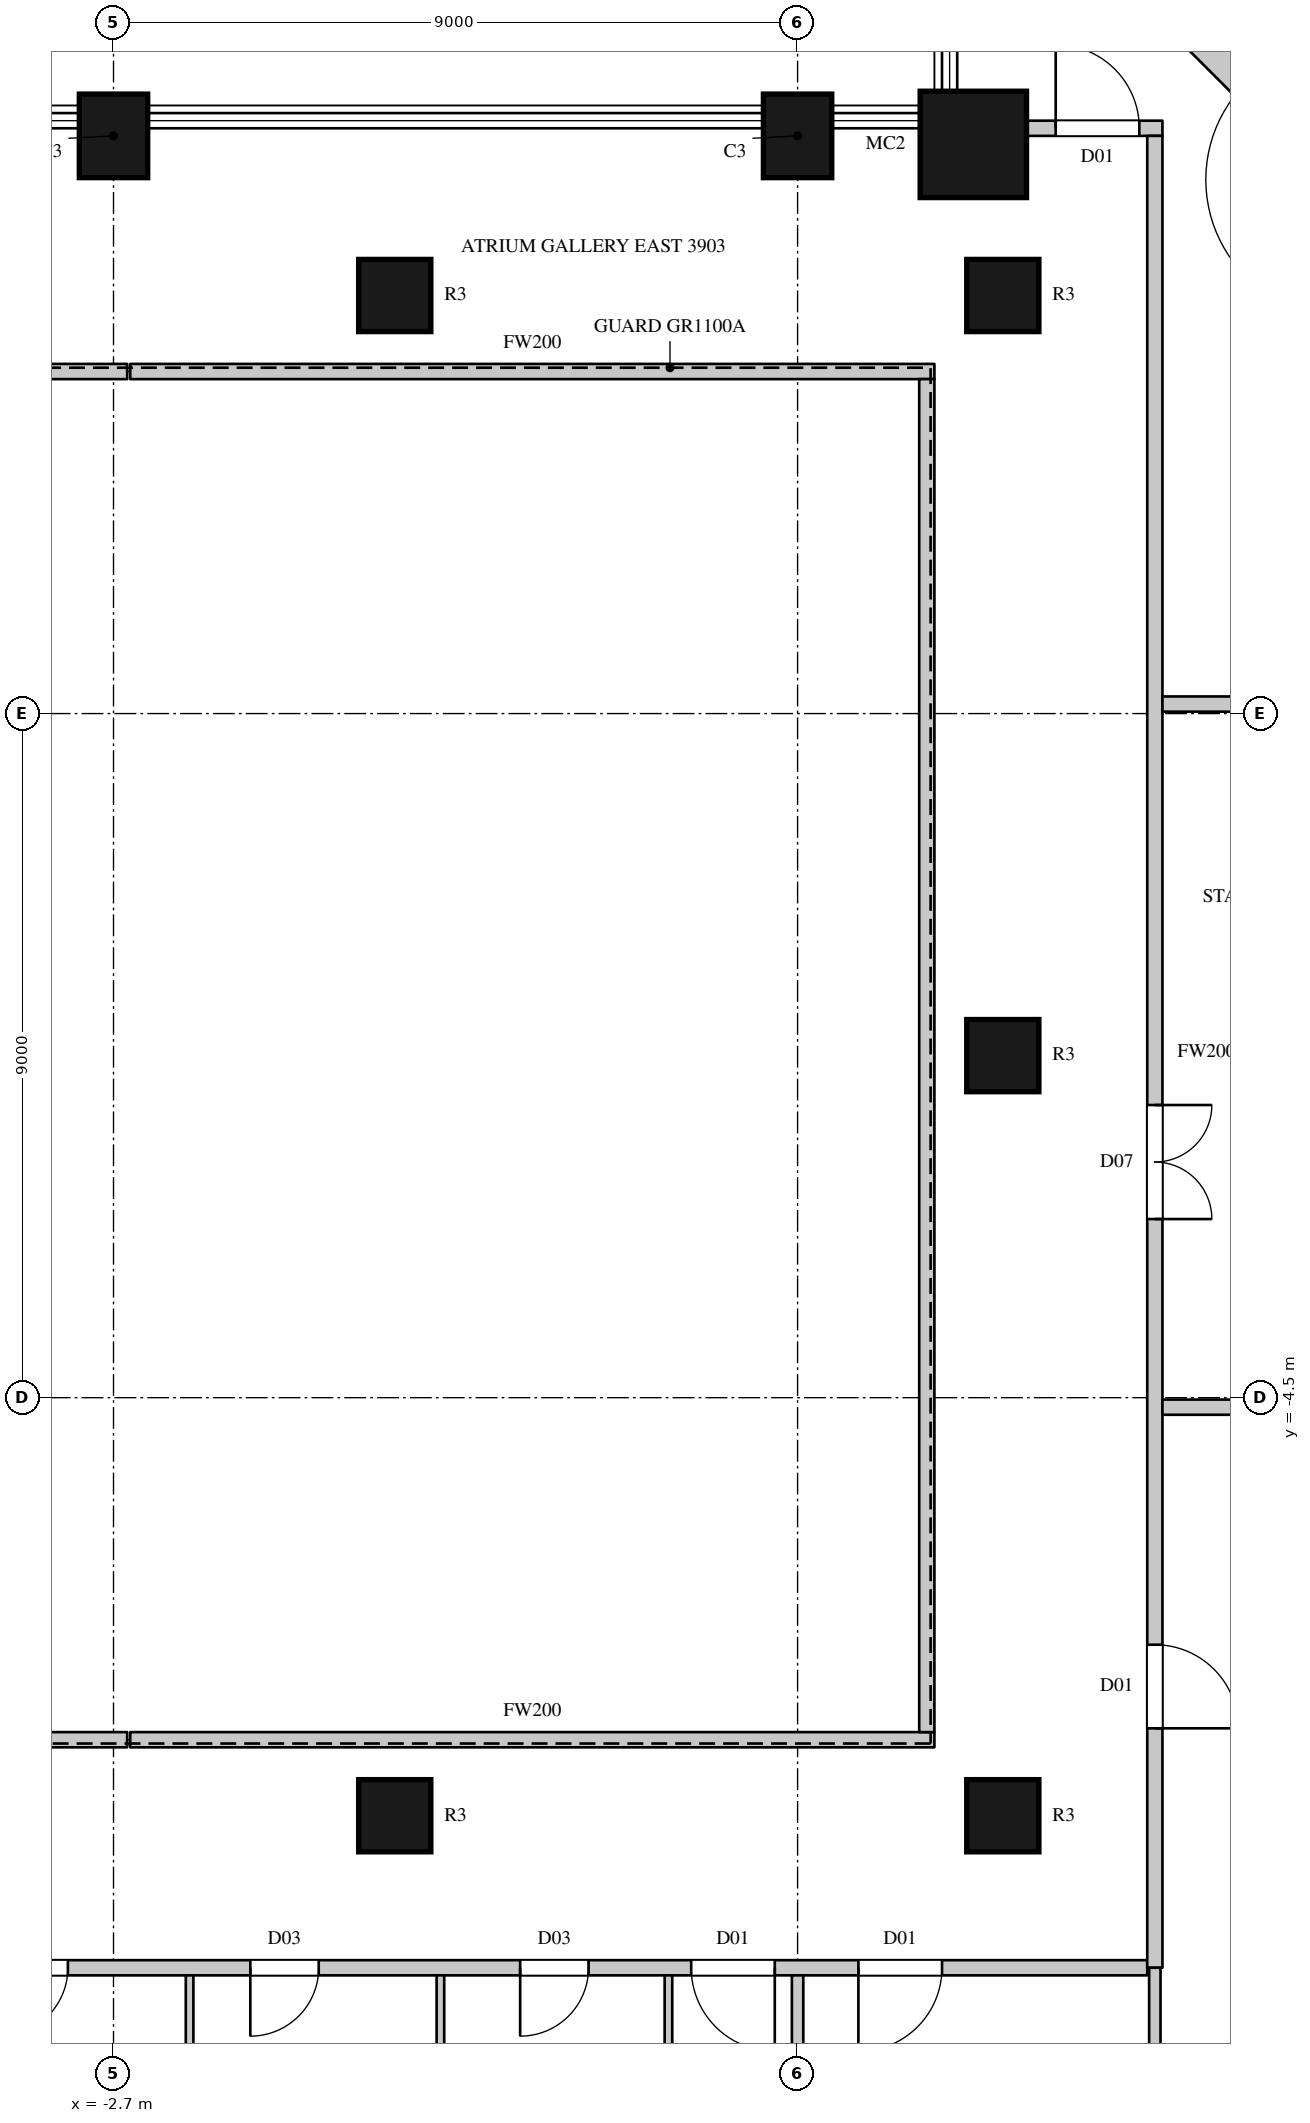
"""IFC4 building model, lengths in metres.
Left out: names, types, materials, properties, quantities, classifications, styles, units other than length and angle.
Written with IfcOpenShell. Run it as: python <this file> out.ifc"""

import sys

from ifc_helpers import new_model, si_unit, direction, frame, frame_2d, origin, origin_2d, place, context, subcontext, project, spatial, rectangle, circle, extrude, element, fill, save


model = new_model("IFC4")
c1 = context("Model", 3, precision=1e-05, world=origin(), true_north=direction((0.0, 1.0)))
c2 = subcontext(c1, "Body", "Model", "MODEL_VIEW")
j1 = project(units=[si_unit("LENGTHUNIT", "METRE"), si_unit("PLANEANGLEUNIT", "RADIAN")], contexts=[c1])
p1 = place(None, origin())
s1 = spatial("IfcSite", under=j1, at=p1, CompositionType="ELEMENT")
p2 = place(p1, origin())
s2 = spatial("IfcBuilding", under=s1, at=p2, CompositionType="ELEMENT")
p3 = place(p2, frame((0.0, 0.0, 181.0)))
s3 = spatial("IfcBuildingStorey", under=s2, at=p3, CompositionType="ELEMENT", Elevation=181.0)
p4 = place(p3, frame((8.612, 11.988, 0.0), z_axis=(0.0, 0.0, 1.0), x_axis=(1.0, 0.0, 0.0)))
e1 = element("IfcColumn", 1, at=p4, inside=s3, PredefinedType="COLUMN", context=c2, shape_type="SweptSolid", body=[
    extrude(circle(Radius=0.7, at=origin_2d()), origin(), (0.0, 0.0, 1.0), 4.1),
])
for number, where, z_axis, x_axis in (
    (2, (6.3, 12.1, 0.0), (0.0, 0.0, 1.0), (-1.0, 0.0, 0.0)),
    (3, (-2.7, 12.1, 0.0), (0.0, 0.0, 1.0), (-1.0, 0.0, 0.0)),
):
    element("IfcColumn", number, at=place(p3, frame(where, z_axis=z_axis, x_axis=x_axis)), inside=s3, PredefinedType="COLUMN", context=c2, shape_type="SweptSolid", body=[
        extrude(rectangle(XDim=0.9, YDim=1.1, at=origin_2d()), origin(), (0.0, 0.0, 1.0), 4.1),
    ])
for number, where, z_axis, x_axis in (
    (4, (1.0, -10.0, 0.0), (0.0, 0.0, 1.0), (1.0, 0.0, 0.0)),
    (5, (1.0, 10.0, 0.0), (0.0, 0.0, 1.0), (1.0, 0.0, 0.0)),
    (6, (9.0, -10.0, 0.0), (0.0, 0.0, 1.0), (1.0, 0.0, 0.0)),
    (7, (9.0, 0.0, 0.0), (0.0, 0.0, 1.0), (1.0, 0.0, 0.0)),
    (8, (9.0, 10.0, 0.0), (0.0, 0.0, 1.0), (1.0, 0.0, 0.0)),
):
    element("IfcColumn", number, at=place(p3, frame(where, z_axis=z_axis, x_axis=x_axis)), inside=s3, PredefinedType="COLUMN", context=c2, shape_type="SweptSolid", body=[
        extrude(circle(Radius=0.475, at=origin_2d()), origin(), (0.0, 0.0, 1.0), 4.1),
    ])
p5 = place(p3, frame((13.941, 11.053, 0.0), z_axis=(0.0, 0.0, 1.0), x_axis=(-0.707106781187, 0.707106781187, 0.0)))
e9 = element("IfcWall", 9, at=p5, inside=s3, PredefinedType="SOLIDWALL", context=c2, shape_type="SweptSolid", body=[
    extrude(rectangle(XDim=6.505, YDim=0.45, at=frame_2d((3.252, 0.0))), origin(), (0.0, 0.0, 1.0), 3.8),
])
p6 = place(p5, frame((0.665, 0.0, 0.0)))
e10 = element("IfcOpeningElement", 10, at=p6, cuts=e9, PredefinedType="OPENING", context=c2, shape_type="SweptSolid", body=[
    extrude(rectangle(XDim=1.8, YDim=2.4, at=frame_2d((0.9, 1.2))), frame((0.0, 0.235, 0.0), z_axis=(0.0, -1.0, 0.0), x_axis=(1.0, 0.0, 0.0)), (0.0, 0.0, 1.0), 0.47),
])
p7 = place(p3, frame((-10.9, -12.0, 0.0), z_axis=(0.0, 0.0, 1.0), x_axis=(1.0, 0.0, 0.0)))
e11 = element("IfcWall", 11, at=p7, inside=s3, PredefinedType="PARTITIONING", context=c2, shape_type="SweptSolid", body=[
    extrude(rectangle(XDim=21.8, YDim=0.2, at=frame_2d((10.9, 0.0))), origin(), (0.0, 0.0, 1.0), 3.8),
])
p8 = place(p7, frame((0.95, 0.0, 0.0)))
e12 = element("IfcOpeningElement", 12, at=p8, cuts=e11, PredefinedType="OPENING", context=c2, shape_type="SweptSolid", body=[
    extrude(rectangle(XDim=0.9, YDim=2.2, at=frame_2d((0.45, 1.1))), frame((0.0, 0.11, 0.0), z_axis=(0.0, -1.0, 0.0), x_axis=(1.0, 0.0, 0.0)), (0.0, 0.0, 1.0), 0.22),
])
p9 = place(p7, frame((3.95, 0.0, 0.0)))
e13 = element("IfcOpeningElement", 13, at=p9, cuts=e11, PredefinedType="OPENING", context=c2, shape_type="SweptSolid", body=[
    extrude(rectangle(XDim=0.9, YDim=2.2, at=frame_2d((0.45, 1.1))), frame((0.0, 0.11, 0.0), z_axis=(0.0, -1.0, 0.0), x_axis=(1.0, 0.0, 0.0)), (0.0, 0.0, 1.0), 0.22),
])
p10 = place(p7, frame((6.7, 0.0, 0.0)))
e14 = element("IfcOpeningElement", 14, at=p10, cuts=e11, PredefinedType="OPENING", context=c2, shape_type="SweptSolid", body=[
    extrude(rectangle(XDim=0.9, YDim=2.2, at=frame_2d((0.45, 1.1))), frame((0.0, 0.11, 0.0), z_axis=(0.0, -1.0, 0.0), x_axis=(1.0, 0.0, 0.0)), (0.0, 0.0, 1.0), 0.22),
])
p11 = place(p7, frame((10.0, 0.0, 0.0)))
e15 = element("IfcOpeningElement", 15, at=p11, cuts=e11, PredefinedType="OPENING", context=c2, shape_type="SweptSolid", body=[
    extrude(rectangle(XDim=0.9, YDim=2.2, at=frame_2d((0.45, 1.1))), frame((0.0, 0.11, 0.0), z_axis=(0.0, -1.0, 0.0), x_axis=(1.0, 0.0, 0.0)), (0.0, 0.0, 1.0), 0.22),
])
p12 = place(p7, frame((13.55, 0.0, 0.0)))
e16 = element("IfcOpeningElement", 16, at=p12, cuts=e11, PredefinedType="OPENING", context=c2, shape_type="SweptSolid", body=[
    extrude(rectangle(XDim=0.9, YDim=2.2, at=frame_2d((0.45, 1.1))), frame((0.0, 0.11, 0.0), z_axis=(0.0, -1.0, 0.0), x_axis=(1.0, 0.0, 0.0)), (0.0, 0.0, 1.0), 0.22),
])
p13 = place(p7, frame((15.8, 0.0, 0.0)))
e17 = element("IfcOpeningElement", 17, at=p13, cuts=e11, PredefinedType="OPENING", context=c2, shape_type="SweptSolid", body=[
    extrude(rectangle(XDim=1.1, YDim=2.4, at=frame_2d((0.55, 1.2))), frame((0.0, 0.11, 0.0), z_axis=(0.0, -1.0, 0.0), x_axis=(1.0, 0.0, 0.0)), (0.0, 0.0, 1.0), 0.22),
])
p14 = place(p7, frame((18.0, 0.0, 0.0)))
e18 = element("IfcOpeningElement", 18, at=p14, cuts=e11, PredefinedType="OPENING", context=c2, shape_type="SweptSolid", body=[
    extrude(rectangle(XDim=1.1, YDim=2.4, at=frame_2d((0.55, 1.2))), frame((0.0, 0.11, 0.0), z_axis=(0.0, -1.0, 0.0), x_axis=(1.0, 0.0, 0.0)), (0.0, 0.0, 1.0), 0.22),
])
for number, where, z_axis, x_axis in (
    (19, (-6.1, -9.0, 0.0), (0.0, 0.0, 1.0), (1.0, 0.0, 0.0)),
    (20, (-6.1, 9.0, 0.0), (0.0, 0.0, 1.0), (1.0, 0.0, 0.0)),
):
    element("IfcWall", number, at=place(p3, frame(where, z_axis=z_axis, x_axis=x_axis)), inside=s3, PredefinedType="PARTITIONING", context=c2, shape_type="SweptSolid", body=[
        extrude(rectangle(XDim=3.58, YDim=0.2, at=frame_2d((1.79, 0.0))), origin(), (0.0, 0.0, 1.0), 3.8),
    ])
for number, where, z_axis, x_axis in (
    (21, (-2.48, -9.0, 0.0), (0.0, 0.0, 1.0), (1.0, 0.0, 0.0)),
    (22, (-2.48, 9.0, 0.0), (0.0, 0.0, 1.0), (1.0, 0.0, 0.0)),
):
    element("IfcWall", number, at=place(p3, frame(where, z_axis=z_axis, x_axis=x_axis)), inside=s3, PredefinedType="PARTITIONING", context=c2, shape_type="SweptSolid", body=[
        extrude(rectangle(XDim=10.58, YDim=0.2, at=frame_2d((5.29, 0.0))), origin(), (0.0, 0.0, 1.0), 3.8),
    ])
p15 = place(p3, frame((8.0, -8.9, 0.0), z_axis=(0.0, 0.0, 1.0), x_axis=(0.0, 1.0, 0.0)))
e23 = element("IfcWall", 23, at=p15, inside=s3, PredefinedType="PARTITIONING", context=c2, shape_type="SweptSolid", body=[
    extrude(rectangle(XDim=17.8, YDim=0.2, at=frame_2d((8.9, 0.0))), origin(), (0.0, 0.0, 1.0), 3.8),
])
p16 = place(p3, frame((9.296, 12.2, 0.0), z_axis=(0.0, 0.0, 1.0), x_axis=(1.0, 0.0, 0.0)))
e24 = element("IfcWall", 24, at=p16, inside=s3, PredefinedType="PARTITIONING", context=c2, shape_type="SweptSolid", body=[
    extrude(rectangle(XDim=1.804, YDim=0.2, at=frame_2d((0.902, 0.0))), origin(), (0.0, 0.0, 1.0), 3.8),
])
p17 = place(p16, frame((0.4, 0.0, 0.0)))
e25 = element("IfcOpeningElement", 25, at=p17, cuts=e24, PredefinedType="OPENING", context=c2, shape_type="SweptSolid", body=[
    extrude(rectangle(XDim=1.1, YDim=2.4, at=frame_2d((0.55, 1.2))), frame((0.0, 0.11, 0.0), z_axis=(0.0, -1.0, 0.0), x_axis=(1.0, 0.0, 0.0)), (0.0, 0.0, 1.0), 0.22),
])
p18 = place(p3, frame((11.0, -12.0, 0.0), z_axis=(0.0, 0.0, 1.0), x_axis=(0.0, 1.0, 0.0)))
e26 = element("IfcWall", 26, at=p18, inside=s3, PredefinedType="PARTITIONING", context=c2, shape_type="SweptSolid", body=[
    extrude(rectangle(XDim=24.1, YDim=0.2, at=frame_2d((12.05, 0.0))), origin(), (0.0, 0.0, 1.0), 3.8),
])
p19 = place(p18, frame((9.85, 0.0, 0.0)))
e27 = element("IfcOpeningElement", 27, at=p19, cuts=e26, PredefinedType="OPENING", context=c2, shape_type="SweptSolid", body=[
    extrude(rectangle(XDim=1.5, YDim=2.4, at=frame_2d((0.75, 1.2))), frame((0.0, 0.11, 0.0), z_axis=(0.0, -1.0, 0.0), x_axis=(1.0, 0.0, 0.0)), (0.0, 0.0, 1.0), 0.22),
])
p20 = place(p18, frame((3.15, 0.0, 0.0)))
e28 = element("IfcOpeningElement", 28, at=p20, cuts=e26, PredefinedType="OPENING", context=c2, shape_type="SweptSolid", body=[
    extrude(rectangle(XDim=1.1, YDim=2.4, at=frame_2d((0.55, 1.2))), frame((0.0, 0.11, 0.0), z_axis=(0.0, -1.0, 0.0), x_axis=(1.0, 0.0, 0.0)), (0.0, 0.0, 1.0), 0.22),
])
for number, where, z_axis, x_axis in (
    (29, (11.1, -4.625, 0.0), (0.0, 0.0, 1.0), (1.0, 0.0, 0.0)),
    (30, (11.1, 4.625, 0.0), (0.0, 0.0, 1.0), (1.0, 0.0, 0.0)),
):
    element("IfcWall", number, at=place(p3, frame(where, z_axis=z_axis, x_axis=x_axis)), inside=s3, PredefinedType="PARTITIONING", context=c2, shape_type="SweptSolid", body=[
        extrude(rectangle(XDim=3.575, YDim=0.2, at=frame_2d((1.788, 0.0))), origin(), (0.0, 0.0, 1.0), 3.8),
    ])
p21 = place(p3, frame((6.3, -16.05, 0.0), z_axis=(0.0, 0.0, 1.0), x_axis=(0.0, 1.0, 0.0)))
e31 = element("IfcWall", 31, at=p21, inside=s3, PredefinedType="PARTITIONING", context=c2, shape_type="SweptSolid", body=[
    extrude(rectangle(XDim=3.95, YDim=0.15, at=frame_2d((1.975, 0.0))), origin(), (0.0, 0.0, 1.0), 3.25),
])
p22 = place(p3, frame((11.0, -16.7, 0.0), z_axis=(0.0, 0.0, 1.0), x_axis=(0.0, 1.0, 0.0)))
e32 = element("IfcWall", 32, at=p22, inside=s3, PredefinedType="PARTITIONING", context=c2, shape_type="SweptSolid", body=[
    extrude(rectangle(XDim=4.7, YDim=0.15, at=frame_2d((2.35, 0.0))), origin(), (0.0, 0.0, 1.0), 3.8),
])
p23 = place(p3, frame((-1.699, -16.7, 0.0), z_axis=(0.0, 0.0, 1.0), x_axis=(0.0, 1.0, 0.0)))
e33 = element("IfcWall", 33, at=p23, inside=s3, PredefinedType="PARTITIONING", context=c2, shape_type="SweptSolid", body=[
    extrude(rectangle(XDim=4.6, YDim=0.1, at=frame_2d((2.3, 0.0))), origin(), (0.0, 0.0, 1.0), 3.8),
])
p24 = place(p3, frame((1.601, -16.7, 0.0), z_axis=(0.0, 0.0, 1.0), x_axis=(0.0, 1.0, 0.0)))
e34 = element("IfcWall", 34, at=p24, inside=s3, PredefinedType="PARTITIONING", context=c2, shape_type="SweptSolid", body=[
    extrude(rectangle(XDim=4.6, YDim=0.1, at=frame_2d((2.3, 0.0))), origin(), (0.0, 0.0, 1.0), 3.15),
])
p25 = place(p3, frame((4.601, -16.7, 0.0), z_axis=(0.0, 0.0, 1.0), x_axis=(0.0, 1.0, 0.0)))
e35 = element("IfcWall", 35, at=p25, inside=s3, PredefinedType="PARTITIONING", context=c2, shape_type="SweptSolid", body=[
    extrude(rectangle(XDim=4.6, YDim=0.1, at=frame_2d((2.3, 0.0))), origin(), (0.0, 0.0, 1.0), 3.8),
])
p26 = place(p19, origin())
e36 = element("IfcDoor", 36, at=p26, inside=s3, OperationType="DOUBLE_DOOR_SINGLE_SWING", PredefinedType="DOOR", context=c2, shape_type="SweptSolid", body=[
    extrude(rectangle(XDim=1.5, YDim=2.4, at=frame_2d((0.75, 1.2))), frame((0.0, 0.025, 0.0), z_axis=(0.0, -1.0, 0.0), x_axis=(1.0, 0.0, 0.0)), (0.0, 0.0, 1.0), 0.05),
])
fill(e27, e36)
p27 = place(p10, origin())
e37 = element("IfcDoor", 37, at=p27, inside=s3, OperationType="SINGLE_SWING_RIGHT", PredefinedType="DOOR", context=c2, shape_type="SweptSolid", body=[
    extrude(rectangle(XDim=0.9, YDim=2.2, at=frame_2d((0.45, 1.1))), frame((0.0, 0.025, 0.0), z_axis=(0.0, -1.0, 0.0), x_axis=(1.0, 0.0, 0.0)), (0.0, 0.0, 1.0), 0.05),
])
fill(e14, e37)
p28 = place(p11, origin())
e38 = element("IfcDoor", 38, at=p28, inside=s3, OperationType="SINGLE_SWING_RIGHT", PredefinedType="DOOR", context=c2, shape_type="SweptSolid", body=[
    extrude(rectangle(XDim=0.9, YDim=2.2, at=frame_2d((0.45, 1.1))), frame((0.0, 0.025, 0.0), z_axis=(0.0, -1.0, 0.0), x_axis=(1.0, 0.0, 0.0)), (0.0, 0.0, 1.0), 0.05),
])
fill(e15, e38)
p29 = place(p12, origin())
e39 = element("IfcDoor", 39, at=p29, inside=s3, OperationType="SINGLE_SWING_RIGHT", PredefinedType="DOOR", context=c2, shape_type="SweptSolid", body=[
    extrude(rectangle(XDim=0.9, YDim=2.2, at=frame_2d((0.45, 1.1))), frame((0.0, 0.025, 0.0), z_axis=(0.0, -1.0, 0.0), x_axis=(1.0, 0.0, 0.0)), (0.0, 0.0, 1.0), 0.05),
])
fill(e16, e39)
p30 = place(p13, origin())
e40 = element("IfcDoor", 40, at=p30, inside=s3, OperationType="SINGLE_SWING_LEFT", PredefinedType="DOOR", context=c2, shape_type="SweptSolid", body=[
    extrude(rectangle(XDim=1.1, YDim=2.4, at=frame_2d((0.55, 1.2))), frame((0.0, 0.025, 0.0), z_axis=(0.0, -1.0, 0.0), x_axis=(1.0, 0.0, 0.0)), (0.0, 0.0, 1.0), 0.05),
])
fill(e17, e40)
p31 = place(p14, origin())
e41 = element("IfcDoor", 41, at=p31, inside=s3, OperationType="SINGLE_SWING_RIGHT", PredefinedType="DOOR", context=c2, shape_type="SweptSolid", body=[
    extrude(rectangle(XDim=1.1, YDim=2.4, at=frame_2d((0.55, 1.2))), frame((0.0, 0.025, 0.0), z_axis=(0.0, -1.0, 0.0), x_axis=(1.0, 0.0, 0.0)), (0.0, 0.0, 1.0), 0.05),
])
fill(e18, e41)
p32 = place(p17, origin())
e42 = element("IfcDoor", 42, at=p32, inside=s3, OperationType="SINGLE_SWING_LEFT", PredefinedType="DOOR", context=c2, shape_type="SweptSolid", body=[
    extrude(rectangle(XDim=1.1, YDim=2.4, at=frame_2d((0.55, 1.2))), frame((0.0, 0.025, 0.0), z_axis=(0.0, -1.0, 0.0), x_axis=(1.0, 0.0, 0.0)), (0.0, 0.0, 1.0), 0.05),
])
fill(e25, e42)
p33 = place(p20, origin())
e43 = element("IfcDoor", 43, at=p33, inside=s3, OperationType="SINGLE_SWING_RIGHT", PredefinedType="DOOR", context=c2, shape_type="SweptSolid", body=[
    extrude(rectangle(XDim=1.1, YDim=2.4, at=frame_2d((0.55, 1.2))), frame((0.0, 0.025, 0.0), z_axis=(0.0, -1.0, 0.0), x_axis=(1.0, 0.0, 0.0)), (0.0, 0.0, 1.0), 0.05),
])
fill(e28, e43)
save(model, sys.argv[1])
